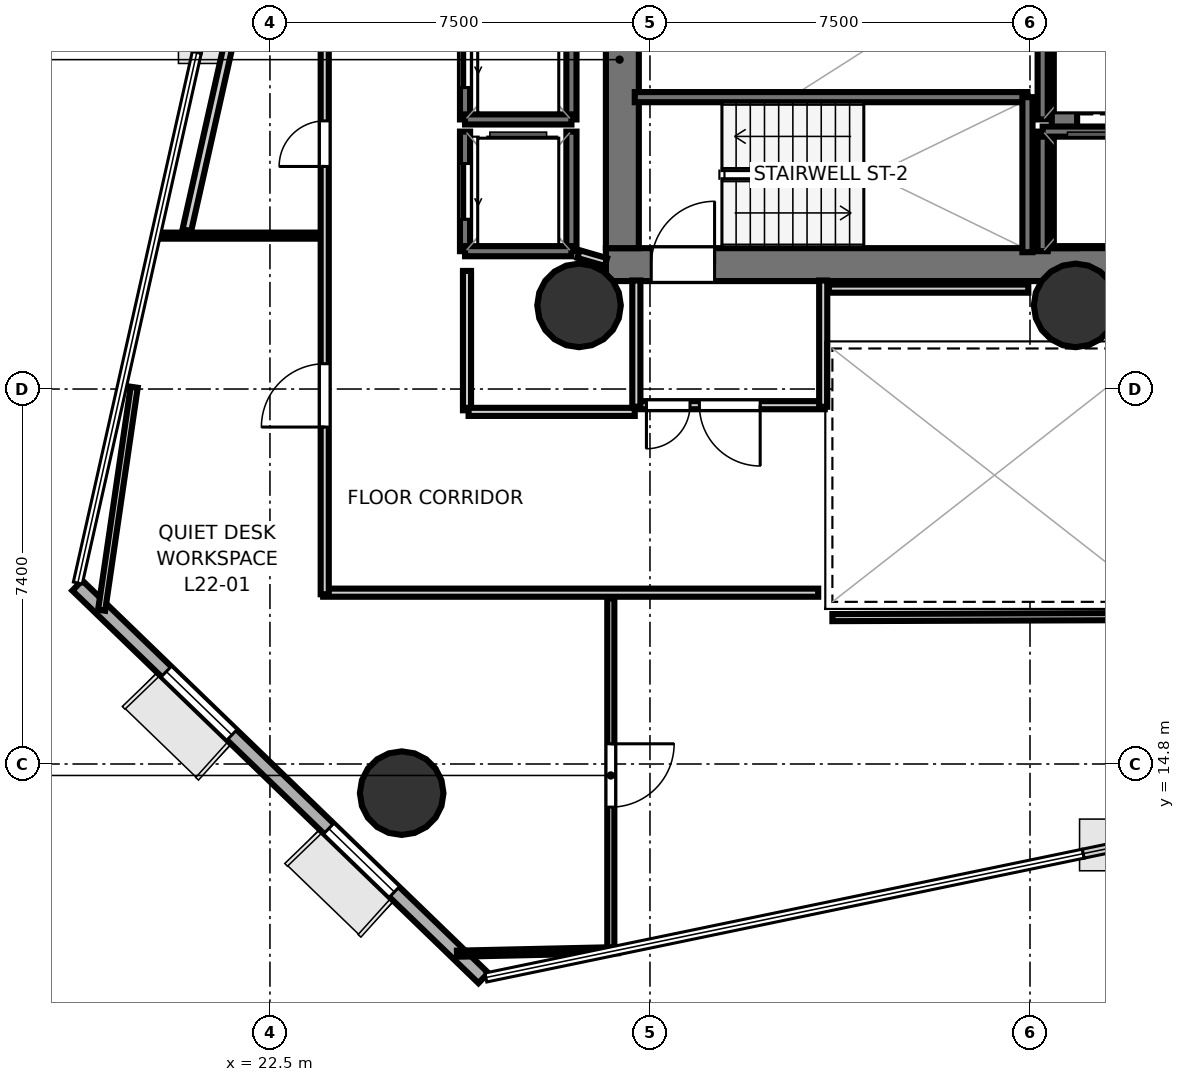
"""IFC4 building model, lengths in metres.
Left out: names, types, materials, properties, quantities, classifications, styles, units other than length and angle.
Written with IfcOpenShell. Run it as: python <this file> out.ifc"""

import sys

from ifc_helpers import new_model, si_unit, direction, frame, frame_2d, origin, origin_2d, place, context, subcontext, project, spatial, rectangle, hollow_circle, extrude, element, fill, save


model = new_model("IFC4")
c1 = context("Model", 3, precision=1e-05, world=origin(), true_north=direction((0.0, 1.0)))
c2 = subcontext(c1, "Body", "Model", "MODEL_VIEW")
j1 = project(units=[si_unit("LENGTHUNIT", "METRE"), si_unit("PLANEANGLEUNIT", "RADIAN")], contexts=[c1])
p1 = place(None, origin())
s1 = spatial("IfcSite", under=j1, at=p1, CompositionType="ELEMENT")
p2 = place(p1, origin())
s2 = spatial("IfcBuilding", under=s1, at=p2, CompositionType="ELEMENT")
p3 = place(p2, frame((0.0, 0.0, 89.5)))
s3 = spatial("IfcBuildingStorey", under=s2, at=p3, CompositionType="ELEMENT", Elevation=89.5)
p4 = place(p3, frame((29.13, 24.655, 0.0), z_axis=(0.0, 0.0, 1.0), x_axis=(1.0, 0.0, 0.0)))
e1 = element("IfcWall", 1, at=p4, inside=s3, PredefinedType="SHEAR", context=c2, shape_type="SweptSolid", body=[
    extrude(rectangle(XDim=10.72, YDim=0.65, at=frame_2d((5.36, 0.0))), origin(), (0.0, 0.0, 1.0), 3.4),
])
p5 = place(p4, frame((0.895, 0.0, 0.0)))
e2 = element("IfcOpeningElement", 2, at=p5, cuts=e1, PredefinedType="OPENING", context=c2, shape_type="SweptSolid", body=[
    extrude(rectangle(XDim=1.25, YDim=2.15, at=frame_2d((0.625, 1.075))), frame((0.0, 0.335, 0.0), z_axis=(0.0, -1.0, 0.0), x_axis=(1.0, 0.0, 0.0)), (0.0, 0.0, 1.0), 0.67),
])
p6 = place(p3, frame((29.455, 24.98, 0.0), z_axis=(0.0, 0.0, 1.0), x_axis=(0.0, 1.0, 0.0)))
e3 = element("IfcWall", 3, at=p6, inside=s3, PredefinedType="SHEAR", context=c2, shape_type="SweptSolid", body=[
    extrude(rectangle(XDim=7.44, YDim=0.65, at=frame_2d((3.72, 0.0))), origin(), (0.0, 0.0, 1.0), 3.4),
])
p7 = place(p3, frame((38.18, 24.98, 0.0), z_axis=(0.0, 0.0, 1.0), x_axis=(0.0, 1.0, 0.0)))
e4 = element("IfcWall", 4, at=p7, inside=s3, PredefinedType="SHEAR", context=c2, shape_type="SweptSolid", body=[
    extrude(rectangle(XDim=7.44, YDim=0.5, at=frame_2d((3.72, 0.0))), origin(), (0.0, 0.0, 1.0), 3.4),
])
for number, where, z_axis, x_axis in (
    (5, (28.6, 23.85, 0.0), (0.0, 0.0, 1.0), (1.0, 0.0, 0.0)),
    (6, (38.4, 23.85, 0.0), (0.0, 0.0, 1.0), (1.0, 0.0, 0.0)),
    (7, (25.1, 14.225, 0.0), (0.0, 0.0, 1.0), (1.0, 0.0, 0.0)),
):
    element("IfcColumn", number, at=place(p3, frame(where, z_axis=z_axis, x_axis=x_axis)), inside=s3, PredefinedType="COLUMN", context=c2, shape_type="SweptSolid", body=[
        extrude(hollow_circle(Radius=0.825, WallThickness=0.04, at=origin_2d()), origin(), (0.0, 0.0, 1.0), 3.7),
    ])
p8 = place(p3, frame((18.697, 18.323, 0.0), z_axis=(0.0, 0.0, 1.0), x_axis=(0.71903981558, -0.694968879599, 0.0)))
e8 = element("IfcWall", 8, at=p8, inside=s3, PredefinedType="SOLIDWALL", context=c2, shape_type="SweptSolid", body=[
    extrude(rectangle(XDim=11.147, YDim=0.28, at=frame_2d((5.573, 0.0))), origin(), (0.0, 0.0, 1.0), 3.4),
])
p9 = place(p8, frame((2.444, 0.0, 0.85)))
e9 = element("IfcOpeningElement", 9, at=p9, cuts=e8, PredefinedType="OPENING", context=c2, shape_type="SweptSolid", body=[
    extrude(rectangle(XDim=1.8, YDim=2.1, at=frame_2d((0.9, 1.05))), frame((0.0, 0.15, 0.0), z_axis=(0.0, -1.0, 0.0), x_axis=(1.0, 0.0, 0.0)), (0.0, 0.0, 1.0), 0.3),
])
p10 = place(p8, frame((6.903, 0.0, 0.85)))
e10 = element("IfcOpeningElement", 10, at=p10, cuts=e8, PredefinedType="OPENING", context=c2, shape_type="SweptSolid", body=[
    extrude(rectangle(XDim=1.8, YDim=2.1, at=frame_2d((0.9, 1.05))), frame((0.0, 0.15, 0.0), z_axis=(0.0, -1.0, 0.0), x_axis=(1.0, 0.0, 0.0)), (0.0, 0.0, 1.0), 0.3),
])
p11 = place(p3, frame((29.7, 27.96, 0.0), z_axis=(0.0, 0.0, 1.0), x_axis=(1.0, 0.0, 0.0)))
e11 = element("IfcWall", 11, at=p11, inside=s3, PredefinedType="SOLIDWALL", context=c2, shape_type="SweptSolid", body=[
    extrude(rectangle(XDim=7.75, YDim=0.2, at=frame_2d((3.875, 0.0))), origin(), (0.0, 0.0, 1.0), 3.4),
])
p12 = place(p3, frame((37.45, 24.9, 0.0), z_axis=(0.0, 0.0, 1.0), x_axis=(0.0, 1.0, 0.0)))
e12 = element("IfcWall", 12, at=p12, inside=s3, PredefinedType="SOLIDWALL", context=c2, shape_type="SweptSolid", body=[
    extrude(rectangle(XDim=3.06, YDim=0.2, at=frame_2d((1.53, 0.0))), origin(), (0.0, 0.0, 1.0), 3.4),
])
p13 = place(p3, frame((37.75, 24.92, 0.0), z_axis=(0.0, 0.0, 1.0), x_axis=(0.0, 1.0, 0.0)))
e13 = element("IfcWall", 13, at=p13, inside=s3, PredefinedType="SOLIDWALL", context=c2, shape_type="SweptSolid", body=[
    extrude(rectangle(XDim=2.36, YDim=0.2, at=frame_2d((1.18, 0.0))), origin(), (0.0, 0.0, 1.0), 3.4),
])
p14 = place(p3, frame((37.75, 27.28, 0.0), z_axis=(0.0, 0.0, 1.0), x_axis=(1.0, 0.0, 0.0)))
e14 = element("IfcWall", 14, at=p14, inside=s3, PredefinedType="SOLIDWALL", context=c2, shape_type="SweptSolid", body=[
    extrude(rectangle(XDim=2.1, YDim=0.2, at=frame_2d((1.05, 0.0))), origin(), (0.0, 0.0, 1.0), 3.4),
])
p15 = place(p3, frame((28.45, 27.52, 0.0), z_axis=(0.0, 0.0, 1.0), x_axis=(0.0, 1.0, 0.0)))
e15 = element("IfcWall", 15, at=p15, inside=s3, PredefinedType="SOLIDWALL", context=c2, shape_type="SweptSolid", body=[
    extrude(rectangle(XDim=2.36, YDim=0.2, at=frame_2d((1.18, 0.0))), origin(), (0.0, 0.0, 1.0), 3.4),
])
p16 = place(p3, frame((26.35, 27.52, 0.0), z_axis=(0.0, 0.0, 1.0), x_axis=(0.0, 1.0, 0.0)))
e16 = element("IfcWall", 16, at=p16, inside=s3, PredefinedType="SOLIDWALL", context=c2, shape_type="SweptSolid", body=[
    extrude(rectangle(XDim=2.36, YDim=0.2, at=frame_2d((1.18, 0.0))), origin(), (0.0, 0.0, 1.0), 3.4),
])
p17 = place(p16, frame((0.63, 0.0, 0.0)))
e17 = element("IfcOpeningElement", 17, at=p17, cuts=e16, PredefinedType="OPENING", context=c2, shape_type="SweptSolid", body=[
    extrude(rectangle(XDim=1.1, YDim=2.15, at=frame_2d((0.55, 1.075))), frame((0.0, 0.11, 0.0), z_axis=(0.0, -1.0, 0.0), x_axis=(1.0, 0.0, 0.0)), (0.0, 0.0, 1.0), 0.22),
])
p18 = place(p3, frame((26.35, 27.52, 0.0), z_axis=(0.0, 0.0, 1.0), x_axis=(1.0, 0.0, 0.0)))
e18 = element("IfcWall", 18, at=p18, inside=s3, PredefinedType="SOLIDWALL", context=c2, shape_type="SweptSolid", body=[
    extrude(rectangle(XDim=2.1, YDim=0.2, at=frame_2d((1.05, 0.0))), origin(), (0.0, 0.0, 1.0), 3.4),
])
p19 = place(p3, frame((28.45, 24.92, 0.0), z_axis=(0.0, 0.0, 1.0), x_axis=(0.0, 1.0, 0.0)))
e19 = element("IfcWall", 19, at=p19, inside=s3, PredefinedType="SOLIDWALL", context=c2, shape_type="SweptSolid", body=[
    extrude(rectangle(XDim=2.36, YDim=0.2, at=frame_2d((1.18, 0.0))), origin(), (0.0, 0.0, 1.0), 3.4),
])
p20 = place(p3, frame((26.35, 24.92, 0.0), z_axis=(0.0, 0.0, 1.0), x_axis=(0.0, 1.0, 0.0)))
e20 = element("IfcWall", 20, at=p20, inside=s3, PredefinedType="SOLIDWALL", context=c2, shape_type="SweptSolid", body=[
    extrude(rectangle(XDim=2.36, YDim=0.2, at=frame_2d((1.18, 0.0))), origin(), (0.0, 0.0, 1.0), 3.4),
])
p21 = place(p20, frame((0.63, 0.0, 0.0)))
e21 = element("IfcOpeningElement", 21, at=p21, cuts=e20, PredefinedType="OPENING", context=c2, shape_type="SweptSolid", body=[
    extrude(rectangle(XDim=1.1, YDim=2.15, at=frame_2d((0.55, 1.075))), frame((0.0, 0.11, 0.0), z_axis=(0.0, -1.0, 0.0), x_axis=(1.0, 0.0, 0.0)), (0.0, 0.0, 1.0), 0.22),
])
p22 = place(p3, frame((26.35, 24.92, 0.0), z_axis=(0.0, 0.0, 1.0), x_axis=(1.0, 0.0, 0.0)))
e22 = element("IfcWall", 22, at=p22, inside=s3, PredefinedType="SOLIDWALL", context=c2, shape_type="SweptSolid", body=[
    extrude(rectangle(XDim=2.1, YDim=0.2, at=frame_2d((1.05, 0.0))), origin(), (0.0, 0.0, 1.0), 3.4),
])
p23 = place(p3, frame((37.75, 27.52, 0.0), z_axis=(0.0, 0.0, 1.0), x_axis=(0.0, 1.0, 0.0)))
e23 = element("IfcWall", 23, at=p23, inside=s3, PredefinedType="SOLIDWALL", context=c2, shape_type="SweptSolid", body=[
    extrude(rectangle(XDim=2.36, YDim=0.2, at=frame_2d((1.18, 0.0))), origin(), (0.0, 0.0, 1.0), 3.4),
])
p24 = place(p3, frame((33.45, 21.881, 0.0), z_axis=(0.0, 0.0, 1.0), x_axis=(-1.0, 0.0, 0.0)))
e24 = element("IfcWall", 24, at=p24, inside=s3, PredefinedType="PARTITIONING", context=c2, shape_type="SweptSolid", body=[
    extrude(rectangle(XDim=3.75, YDim=0.16, at=frame_2d((1.875, 0.0))), origin(), (0.0, 0.0, 1.0), 2.72),
])
p25 = place(p24, frame((1.275, 0.0, 0.0)))
e25 = element("IfcOpeningElement", 25, at=p25, cuts=e24, PredefinedType="OPENING", context=c2, shape_type="SweptSolid", body=[
    extrude(rectangle(XDim=1.2, YDim=2.15, at=frame_2d((0.6, 1.075))), frame((0.0, 0.09, 0.0), z_axis=(0.0, -1.0, 0.0), x_axis=(1.0, 0.0, 0.0)), (0.0, 0.0, 1.0), 0.18),
])
p26 = place(p24, frame((2.66, 0.0, 0.0)))
e26 = element("IfcOpeningElement", 26, at=p26, cuts=e24, PredefinedType="OPENING", context=c2, shape_type="SweptSolid", body=[
    extrude(rectangle(XDim=0.86, YDim=2.05, at=frame_2d((0.43, 1.025))), frame((0.0, 0.09, 0.0), z_axis=(0.0, -1.0, 0.0), x_axis=(1.0, 0.0, 0.0)), (0.0, 0.0, 1.0), 0.18),
])
for number, where, z_axis, x_axis in (
    (27, (29.731, 21.85, 0.0), (0.0, 0.0, 1.0), (0.0, 1.0, 0.0)),
    (28, (33.419, 24.342, 0.0), (0.0, 0.0, 1.0), (0.0, -1.0, 0.0)),
):
    element("IfcWall", number, at=place(p3, frame(where, z_axis=z_axis, x_axis=x_axis)), inside=s3, PredefinedType="PARTITIONING", context=c2, shape_type="SweptSolid", body=[
        extrude(rectangle(XDim=2.492, YDim=0.16, at=frame_2d((1.246, 0.0))), origin(), (0.0, 0.0, 1.0), 2.72),
    ])
p27 = place(p3, frame((29.13, 24.706, 0.0), z_axis=(0.0, 0.0, 1.0), x_axis=(-0.960451214223, 0.278448316742, 0.0)))
e29 = element("IfcWall", 29, at=p27, inside=s3, PredefinedType="PARTITIONING", context=c2, shape_type="SweptSolid", body=[
    extrude(rectangle(XDim=0.562, YDim=0.16, at=frame_2d((0.281, 0.0))), origin(), (0.0, 0.0, 1.0), 2.72),
])
p28 = place(p3, frame((37.467, 24.181, 0.0), z_axis=(0.0, 0.0, 1.0), x_axis=(-1.0, 0.0, 0.0)))
e30 = element("IfcWall", 30, at=p28, inside=s3, PredefinedType="PARTITIONING", context=c2, shape_type="SweptSolid", body=[
    extrude(rectangle(XDim=3.937, YDim=0.16, at=frame_2d((1.968, 0.0))), origin(), (0.0, 0.0, 1.0), 2.72),
])
p29 = place(p3, frame((26.389, 24.531, 0.0), z_axis=(0.0, 0.0, 1.0), x_axis=(0.0, -1.0, 0.0)))
e31 = element("IfcWall", 31, at=p29, inside=s3, PredefinedType="PARTITIONING", context=c2, shape_type="SweptSolid", body=[
    extrude(rectangle(XDim=2.75, YDim=0.16, at=frame_2d((1.375, 0.0))), origin(), (0.0, 0.0, 1.0), 2.72),
])
p30 = place(p3, frame((26.42, 21.749, 0.0), z_axis=(0.0, 0.0, 1.0), x_axis=(1.0, 0.0, 0.0)))
e32 = element("IfcWall", 32, at=p30, inside=s3, PredefinedType="PARTITIONING", context=c2, shape_type="SweptSolid", body=[
    extrude(rectangle(XDim=3.28, YDim=0.16, at=frame_2d((1.64, 0.0))), origin(), (0.0, 0.0, 1.0), 2.72),
])
p31 = place(p3, frame((33.32, 18.181, 0.0), z_axis=(0.0, 0.0, 1.0), x_axis=(-1.0, 0.0, 0.0)))
e33 = element("IfcWall", 33, at=p31, inside=s3, PredefinedType="PARTITIONING", context=c2, shape_type="SweptSolid", body=[
    extrude(rectangle(XDim=9.77, YDim=0.16, at=frame_2d((4.885, 0.0))), origin(), (0.0, 0.0, 1.0), 2.678),
])
p32 = place(p3, frame((23.581, 18.15, 0.0), z_axis=(0.0, 0.0, 1.0), x_axis=(0.0, 1.0, 0.0)))
e34 = element("IfcWall", 34, at=p32, inside=s3, PredefinedType="PARTITIONING", context=c2, shape_type="SweptSolid", body=[
    extrude(rectangle(XDim=11.333, YDim=0.16, at=frame_2d((5.667, 0.0))), origin(), (0.0, 0.0, 1.0), 2.678),
])
p33 = place(p32, frame((3.299, 0.0, 0.0)))
e35 = element("IfcOpeningElement", 35, at=p33, cuts=e34, PredefinedType="OPENING", context=c2, shape_type="SweptSolid", body=[
    extrude(rectangle(XDim=1.25, YDim=2.2, at=frame_2d((0.625, 1.1))), frame((0.0, 0.09, 0.0), z_axis=(0.0, -1.0, 0.0), x_axis=(1.0, 0.0, 0.0)), (0.0, 0.0, 1.0), 0.18),
])
p34 = place(p32, frame((8.442, 0.0, 0.0)))
e36 = element("IfcOpeningElement", 36, at=p34, cuts=e34, PredefinedType="OPENING", context=c2, shape_type="SweptSolid", body=[
    extrude(rectangle(XDim=0.9, YDim=2.1, at=frame_2d((0.45, 1.05))), frame((0.0, 0.09, 0.0), z_axis=(0.0, -1.0, 0.0), x_axis=(1.0, 0.0, 0.0)), (0.0, 0.0, 1.0), 0.18),
])
p35 = place(p3, frame((29.227, 18.07, 0.0), z_axis=(0.0, 0.0, 1.0), x_axis=(0.0, -1.0, 0.0)))
e37 = element("IfcWall", 37, at=p35, inside=s3, PredefinedType="PARTITIONING", context=c2, shape_type="SweptSolid", body=[
    extrude(rectangle(XDim=6.992, YDim=0.14, at=frame_2d((3.496, 0.0))), origin(), (0.0, 0.0, 1.0), 2.678),
])
p36 = place(p35, frame((2.871, 0.0, 0.0)))
e38 = element("IfcOpeningElement", 38, at=p36, cuts=e37, PredefinedType="OPENING", context=c2, shape_type="SweptSolid", body=[
    extrude(rectangle(XDim=1.25, YDim=2.2, at=frame_2d((0.625, 1.1))), frame((0.0, 0.08, 0.0), z_axis=(0.0, -1.0, 0.0), x_axis=(1.0, 0.0, 0.0)), (0.0, 0.0, 1.0), 0.16),
])
p37 = place(p3, frame((29.369, 11.127, 0.0), z_axis=(0.0, 0.0, 1.0), x_axis=(-0.999755221148, -0.022124596872, 0.0)))
e39 = element("IfcWall", 39, at=p37, inside=s3, PredefinedType="PARTITIONING", context=c2, shape_type="SweptSolid", body=[
    extrude(rectangle(XDim=3.178, YDim=0.12, at=frame_2d((1.589, 0.0))), origin(), (0.0, 0.0, 1.0), 2.72),
])
p38 = place(p3, frame((19.178, 17.835, 0.0), z_axis=(0.0, 0.0, 1.0), x_axis=(0.144487187734, 0.989506671317, 0.0)))
e40 = element("IfcWall", 40, at=p38, inside=s3, PredefinedType="PARTITIONING", context=c2, shape_type="SweptSolid", body=[
    extrude(rectangle(XDim=4.447, YDim=0.14, at=frame_2d((2.224, 0.0))), origin(), (0.0, 0.0, 1.0), 2.72),
])
p39 = place(p3, frame((20.226, 25.227, 0.0), z_axis=(0.0, 0.0, 1.0), x_axis=(1.0, 0.0, 0.0)))
e41 = element("IfcWall", 41, at=p39, inside=s3, PredefinedType="PARTITIONING", context=c2, shape_type="SweptSolid", body=[
    extrude(rectangle(XDim=3.244, YDim=0.12, at=frame_2d((1.622, 0.0))), origin(), (0.0, 0.0, 1.0), 2.678),
])
p40 = place(p3, frame((33.6, 17.689, 0.0), z_axis=(0.0, 0.0, 1.0), x_axis=(0.99999467303, 0.003264033036, 0.0)))
e42 = element("IfcWall", 42, at=p40, inside=s3, PredefinedType="PARTITIONING", context=c2, shape_type="SweptSolid", body=[
    extrude(rectangle(XDim=6.507, YDim=0.14, at=frame_2d((3.254, 0.0))), origin(), (0.0, 0.0, 1.0), 2.72),
])
p41 = place(p3, frame((20.86, 25.335, 0.0), z_axis=(0.0, 0.0, 1.0), x_axis=(0.218848140049, 0.975758931088, 0.0)))
e43 = element("IfcWall", 43, at=p41, inside=s3, PredefinedType="PLUMBINGWALL", context=c2, shape_type="SweptSolid", body=[
    extrude(rectangle(XDim=4.838, YDim=0.175, at=frame_2d((2.419, 0.0))), origin(), (0.0, 0.0, 1.0), 2.72),
])
p42 = place(p5, origin())
e44 = element("IfcDoor", 44, at=p42, inside=s3, OperationType="SINGLE_SWING_RIGHT", PredefinedType="DOOR", context=c2, shape_type="SweptSolid", body=[
    extrude(rectangle(XDim=1.25, YDim=2.15, at=frame_2d((0.625, 1.075))), frame((0.0, 0.025, 0.0), z_axis=(0.0, -1.0, 0.0), x_axis=(1.0, 0.0, 0.0)), (0.0, 0.0, 1.0), 0.05),
])
fill(e2, e44)
p43 = place(p17, origin())
e45 = element("IfcDoor", 45, at=p43, inside=s3, OperationType="SLIDING_TO_LEFT", PredefinedType="DOOR", context=c2, shape_type="SweptSolid", body=[
    extrude(rectangle(XDim=1.1, YDim=2.15, at=frame_2d((0.55, 1.075))), frame((0.0, 0.025, 0.0), z_axis=(0.0, -1.0, 0.0), x_axis=(1.0, 0.0, 0.0)), (0.0, 0.0, 1.0), 0.05),
])
fill(e17, e45)
p44 = place(p21, origin())
e46 = element("IfcDoor", 46, at=p44, inside=s3, OperationType="SLIDING_TO_LEFT", PredefinedType="DOOR", context=c2, shape_type="SweptSolid", body=[
    extrude(rectangle(XDim=1.1, YDim=2.15, at=frame_2d((0.55, 1.075))), frame((0.0, 0.025, 0.0), z_axis=(0.0, -1.0, 0.0), x_axis=(1.0, 0.0, 0.0)), (0.0, 0.0, 1.0), 0.05),
])
fill(e21, e46)
p45 = place(p25, origin())
e47 = element("IfcDoor", 47, at=p45, inside=s3, OperationType="SINGLE_SWING_LEFT", PredefinedType="DOOR", context=c2, shape_type="SweptSolid", body=[
    extrude(rectangle(XDim=1.2, YDim=2.15, at=frame_2d((0.6, 1.075))), frame((0.0, 0.025, 0.0), z_axis=(0.0, -1.0, 0.0), x_axis=(1.0, 0.0, 0.0)), (0.0, 0.0, 1.0), 0.05),
])
fill(e25, e47)
p46 = place(p26, origin())
e48 = element("IfcDoor", 48, at=p46, inside=s3, OperationType="SINGLE_SWING_RIGHT", PredefinedType="DOOR", context=c2, shape_type="SweptSolid", body=[
    extrude(rectangle(XDim=0.86, YDim=2.05, at=frame_2d((0.43, 1.025))), frame((0.0, 0.025, 0.0), z_axis=(0.0, -1.0, 0.0), x_axis=(1.0, 0.0, 0.0)), (0.0, 0.0, 1.0), 0.05),
])
fill(e26, e48)
p47 = place(p33, origin())
e49 = element("IfcDoor", 49, at=p47, inside=s3, OperationType="SINGLE_SWING_LEFT", PredefinedType="DOOR", context=c2, shape_type="SweptSolid", body=[
    extrude(rectangle(XDim=1.25, YDim=2.2, at=frame_2d((0.625, 1.1))), frame((0.0, 0.025, 0.0), z_axis=(0.0, -1.0, 0.0), x_axis=(1.0, 0.0, 0.0)), (0.0, 0.0, 1.0), 0.05),
])
fill(e35, e49)
p48 = place(p34, origin())
e50 = element("IfcDoor", 50, at=p48, inside=s3, OperationType="SINGLE_SWING_LEFT", PredefinedType="DOOR", context=c2, shape_type="SweptSolid", body=[
    extrude(rectangle(XDim=0.9, YDim=2.1, at=frame_2d((0.45, 1.05))), frame((0.0, 0.025, 0.0), z_axis=(0.0, -1.0, 0.0), x_axis=(1.0, 0.0, 0.0)), (0.0, 0.0, 1.0), 0.05),
])
fill(e36, e50)
p49 = place(p36, origin())
e51 = element("IfcDoor", 51, at=p49, inside=s3, OperationType="SINGLE_SWING_LEFT", PredefinedType="DOOR", context=c2, shape_type="SweptSolid", body=[
    extrude(rectangle(XDim=1.25, YDim=2.2, at=frame_2d((0.625, 1.1))), frame((0.0, 0.025, 0.0), z_axis=(0.0, -1.0, 0.0), x_axis=(1.0, 0.0, 0.0)), (0.0, 0.0, 1.0), 0.05),
])
fill(e38, e51)
p50 = place(p9, origin())
e52 = element("IfcWindow", 52, at=p50, inside=s3, PartitioningType="SINGLE_PANEL", PredefinedType="WINDOW", context=c2, shape_type="SweptSolid", body=[
    extrude(rectangle(XDim=1.8, YDim=2.1, at=frame_2d((0.9, 1.05))), frame((0.0, 0.03, 0.0), z_axis=(0.0, -1.0, 0.0), x_axis=(1.0, 0.0, 0.0)), (0.0, 0.0, 1.0), 0.06),
])
fill(e9, e52)
p51 = place(p10, origin())
e53 = element("IfcWindow", 53, at=p51, inside=s3, PartitioningType="SINGLE_PANEL", PredefinedType="WINDOW", context=c2, shape_type="SweptSolid", body=[
    extrude(rectangle(XDim=1.8, YDim=2.1, at=frame_2d((0.9, 1.05))), frame((0.0, 0.03, 0.0), z_axis=(0.0, -1.0, 0.0), x_axis=(1.0, 0.0, 0.0)), (0.0, 0.0, 1.0), 0.06),
])
fill(e10, e53)
save(model, sys.argv[1])
